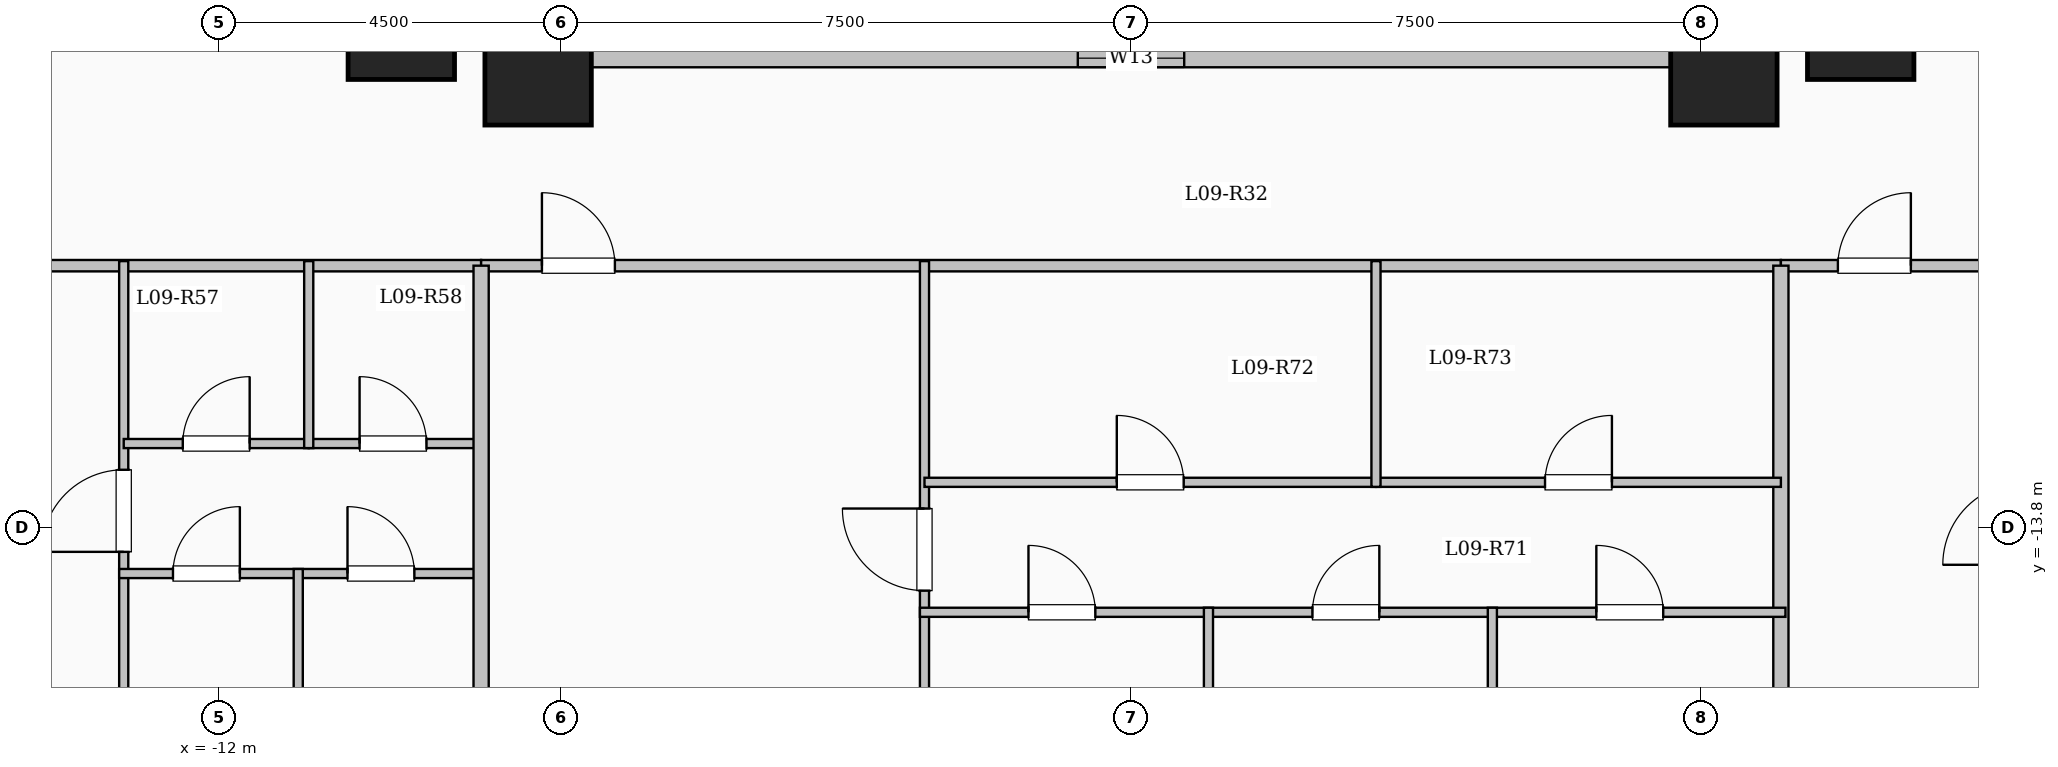
"""IFC4 building model, lengths in metres.
Left out: names, types, materials, properties, quantities, classifications, styles, units other than length and angle.
Written with IfcOpenShell. Run it as: python <this file> out.ifc"""

import sys

from ifc_helpers import new_model, si_unit, direction, frame, frame_2d, origin, origin_2d, place, context, subcontext, project, spatial, rectangle, extrude, element, fill, save


model = new_model("IFC4")
c1 = context("Model", 3, precision=1e-05, world=origin(), true_north=direction((0.0, 1.0)))
c2 = subcontext(c1, "Body", "Model", "MODEL_VIEW")
j1 = project(units=[si_unit("LENGTHUNIT", "METRE"), si_unit("PLANEANGLEUNIT", "RADIAN")], contexts=[c1])
p1 = place(None, origin())
s1 = spatial("IfcSite", under=j1, at=p1, CompositionType="ELEMENT")
p2 = place(p1, origin())
s2 = spatial("IfcBuilding", under=s1, at=p2, CompositionType="ELEMENT")
p3 = place(p2, frame((0.0, 0.0, 37.4)))
s3 = spatial("IfcBuildingStorey", under=s2, at=p3, CompositionType="ELEMENT", Elevation=37.4)
for number, where, z_axis, x_axis in (
    (1, (-7.8, -7.8, 0.0), (0.0, 0.0, 1.0), (1.0, 0.0, 0.0)),
    (2, (7.8, -7.8, 0.0), (0.0, 0.0, 1.0), (1.0, 0.0, 0.0)),
    (3, (-9.6, -7.2, 0.0), (0.0, 0.0, 1.0), (1.0, 0.0, 0.0)),
    (4, (9.6, -7.2, 0.0), (0.0, 0.0, 1.0), (1.0, 0.0, 0.0)),
):
    element("IfcColumn", number, at=place(p3, frame(where, z_axis=z_axis, x_axis=x_axis)), inside=s3, PredefinedType="COLUMN", context=c2, shape_type="SweptSolid", body=[
        extrude(rectangle(XDim=1.4, YDim=1.4, at=origin_2d()), origin(), (0.0, 0.0, 1.0), 3.35),
    ])
p4 = place(p3, frame((-7.62, -7.62, 0.0), z_axis=(0.0, 0.0, 1.0), x_axis=(1.0, 0.0, 0.0)))
e5 = element("IfcWall", 5, at=p4, inside=s3, PredefinedType="SOLIDWALL", context=c2, shape_type="SweptSolid", body=[
    extrude(rectangle(XDim=15.24, YDim=0.24, at=frame_2d((7.62, 0.0))), origin(), (0.0, 0.0, 1.0), 3.1),
])
p5 = place(p4, frame((6.92, 0.0, 0.95)))
e6 = element("IfcOpeningElement", 6, at=p5, cuts=e5, PredefinedType="OPENING", context=c2, shape_type="SweptSolid", body=[
    extrude(rectangle(XDim=1.4, YDim=1.5, at=frame_2d((0.7, 0.75))), frame((0.0, 0.13, 0.0), z_axis=(0.0, -1.0, 0.0), x_axis=(1.0, 0.0, 0.0)), (0.0, 0.0, 1.0), 0.26),
])
p6 = place(p3, frame((7.62, -7.62, 0.0), z_axis=(0.0, 0.0, 1.0), x_axis=(0.0, 1.0, 0.0)))
e7 = element("IfcWall", 7, at=p6, inside=s3, PredefinedType="SOLIDWALL", context=c2, shape_type="SweptSolid", body=[
    extrude(rectangle(XDim=15.24, YDim=0.24, at=frame_2d((7.62, 0.0))), origin(), (0.0, 0.0, 1.0), 3.1),
])
p7 = place(p6, frame((6.92, 0.0, 0.95)))
e8 = element("IfcOpeningElement", 8, at=p7, cuts=e7, PredefinedType="OPENING", context=c2, shape_type="SweptSolid", body=[
    extrude(rectangle(XDim=1.4, YDim=1.5, at=frame_2d((0.7, 0.75))), frame((0.0, 0.13, 0.0), z_axis=(0.0, -1.0, 0.0), x_axis=(1.0, 0.0, 0.0)), (0.0, 0.0, 1.0), 0.26),
])
p8 = place(p3, frame((-7.62, 7.62, 0.0), z_axis=(0.0, 0.0, 1.0), x_axis=(0.0, -1.0, 0.0)))
e9 = element("IfcWall", 9, at=p8, inside=s3, PredefinedType="SOLIDWALL", context=c2, shape_type="SweptSolid", body=[
    extrude(rectangle(XDim=15.24, YDim=0.24, at=frame_2d((7.62, 0.0))), origin(), (0.0, 0.0, 1.0), 3.1),
])
p9 = place(p8, frame((6.92, 0.0, 0.95)))
e10 = element("IfcOpeningElement", 10, at=p9, cuts=e9, PredefinedType="OPENING", context=c2, shape_type="SweptSolid", body=[
    extrude(rectangle(XDim=1.4, YDim=1.5, at=frame_2d((0.7, 0.75))), frame((0.0, 0.13, 0.0), z_axis=(0.0, -1.0, 0.0), x_axis=(1.0, 0.0, 0.0)), (0.0, 0.0, 1.0), 0.26),
])
p10 = place(p3, frame((-22.55, -10.35, 0.0), z_axis=(0.0, 0.0, 1.0), x_axis=(1.0, 0.0, 0.0)))
e11 = element("IfcWall", 11, at=p10, inside=s3, PredefinedType="PARTITIONING", context=c2, shape_type="SweptSolid", body=[
    extrude(rectangle(XDim=14.0, YDim=0.15, at=frame_2d((7.0, 0.0))), origin(), (0.0, 0.0, 1.0), 3.1),
])
p11 = place(p10, frame((0.7, 0.0, 0.0)))
e12 = element("IfcOpeningElement", 12, at=p11, cuts=e11, PredefinedType="OPENING", context=c2, shape_type="SweptSolid", body=[
    extrude(rectangle(XDim=0.96, YDim=2.15, at=frame_2d((0.48, 1.075))), frame((0.0, 0.085, 0.0), z_axis=(0.0, -1.0, 0.0), x_axis=(1.0, 0.0, 0.0)), (0.0, 0.0, 1.0), 0.17),
])
p12 = place(p10, frame((6.838, 0.0, 0.0)))
e13 = element("IfcOpeningElement", 13, at=p12, cuts=e11, PredefinedType="OPENING", context=c2, shape_type="SweptSolid", body=[
    extrude(rectangle(XDim=0.96, YDim=2.15, at=frame_2d((0.48, 1.075))), frame((0.0, 0.085, 0.0), z_axis=(0.0, -1.0, 0.0), x_axis=(1.0, 0.0, 0.0)), (0.0, 0.0, 1.0), 0.17),
])
p13 = place(p3, frame((-8.55, -10.35, 0.0), z_axis=(0.0, 0.0, 1.0), x_axis=(1.0, 0.0, 0.0)))
e14 = element("IfcWall", 14, at=p13, inside=s3, PredefinedType="PARTITIONING", context=c2, shape_type="SweptSolid", body=[
    extrude(rectangle(XDim=17.1, YDim=0.15, at=frame_2d((8.55, 0.0))), origin(), (0.0, 0.0, 1.0), 3.1),
])
p14 = place(p13, frame((0.8, 0.0, 0.0)))
e15 = element("IfcOpeningElement", 15, at=p14, cuts=e14, PredefinedType="OPENING", context=c2, shape_type="SweptSolid", body=[
    extrude(rectangle(XDim=0.96, YDim=2.15, at=frame_2d((0.48, 1.075))), frame((0.0, 0.085, 0.0), z_axis=(0.0, -1.0, 0.0), x_axis=(1.0, 0.0, 0.0)), (0.0, 0.0, 1.0), 0.17),
])
p15 = place(p3, frame((8.55, -10.35, 0.0), z_axis=(0.0, 0.0, 1.0), x_axis=(1.0, 0.0, 0.0)))
e16 = element("IfcWall", 16, at=p15, inside=s3, PredefinedType="PARTITIONING", context=c2, shape_type="SweptSolid", body=[
    extrude(rectangle(XDim=14.0, YDim=0.15, at=frame_2d((7.0, 0.0))), origin(), (0.0, 0.0, 1.0), 3.1),
])
p16 = place(p15, frame((0.75, 0.0, 0.0)))
e17 = element("IfcOpeningElement", 17, at=p16, cuts=e16, PredefinedType="OPENING", context=c2, shape_type="SweptSolid", body=[
    extrude(rectangle(XDim=0.96, YDim=2.15, at=frame_2d((0.48, 1.075))), frame((0.0, 0.085, 0.0), z_axis=(0.0, -1.0, 0.0), x_axis=(1.0, 0.0, 0.0)), (0.0, 0.0, 1.0), 0.17),
])
p17 = place(p15, frame((8.283, 0.0, 0.0)))
e18 = element("IfcOpeningElement", 18, at=p17, cuts=e16, PredefinedType="OPENING", context=c2, shape_type="SweptSolid", body=[
    extrude(rectangle(XDim=0.96, YDim=2.15, at=frame_2d((0.48, 1.075))), frame((0.0, 0.085, 0.0), z_axis=(0.0, -1.0, 0.0), x_axis=(1.0, 0.0, 0.0)), (0.0, 0.0, 1.0), 0.17),
])
p18 = place(p3, frame((-13.252, -23.6, 0.0), z_axis=(0.0, 0.0, 1.0), x_axis=(0.0, 1.0, 0.0)))
e19 = element("IfcWall", 19, at=p18, inside=s3, PredefinedType="PARTITIONING", context=c2, shape_type="SweptSolid", body=[
    extrude(rectangle(XDim=13.31, YDim=0.12, at=frame_2d((6.655, 0.0))), origin(), (0.0, 0.0, 1.0), 3.1),
])
p19 = place(p18, frame((9.485, 0.0, 0.0)))
e20 = element("IfcOpeningElement", 20, at=p19, cuts=e19, PredefinedType="OPENING", context=c2, shape_type="SweptSolid", body=[
    extrude(rectangle(XDim=1.08, YDim=2.15, at=frame_2d((0.54, 1.075))), frame((0.0, 0.07, 0.0), z_axis=(0.0, -1.0, 0.0), x_axis=(1.0, 0.0, 0.0)), (0.0, 0.0, 1.0), 0.14),
])
p20 = place(p3, frame((-13.252, -12.69, 0.0), z_axis=(0.0, 0.0, 1.0), x_axis=(1.0, 0.0, 0.0)))
e21 = element("IfcWall", 21, at=p20, inside=s3, PredefinedType="PARTITIONING", context=c2, shape_type="SweptSolid", body=[
    extrude(rectangle(XDim=2.434, YDim=0.12, at=frame_2d((1.217, 0.0))), origin(), (0.0, 0.0, 1.0), 2.585),
])
p21 = place(p20, frame((0.777, 0.0, 0.0)))
e22 = element("IfcOpeningElement", 22, at=p21, cuts=e21, PredefinedType="OPENING", context=c2, shape_type="SweptSolid", body=[
    extrude(rectangle(XDim=0.88, YDim=2.1, at=frame_2d((0.44, 1.05))), frame((0.0, 0.07, 0.0), z_axis=(0.0, -1.0, 0.0), x_axis=(1.0, 0.0, 0.0)), (0.0, 0.0, 1.0), 0.14),
])
p22 = place(p3, frame((-10.818, -12.69, 0.0), z_axis=(0.0, 0.0, 1.0), x_axis=(1.0, 0.0, 0.0)))
e23 = element("IfcWall", 23, at=p22, inside=s3, PredefinedType="PARTITIONING", context=c2, shape_type="SweptSolid", body=[
    extrude(rectangle(XDim=2.218, YDim=0.12, at=frame_2d((1.109, 0.0))), origin(), (0.0, 0.0, 1.0), 2.585),
])
p23 = place(p22, frame((0.669, 0.0, 0.0)))
e24 = element("IfcOpeningElement", 24, at=p23, cuts=e23, PredefinedType="OPENING", context=c2, shape_type="SweptSolid", body=[
    extrude(rectangle(XDim=0.88, YDim=2.1, at=frame_2d((0.44, 1.05))), frame((0.0, 0.07, 0.0), z_axis=(0.0, -1.0, 0.0), x_axis=(1.0, 0.0, 0.0)), (0.0, 0.0, 1.0), 0.14),
])
p24 = place(p3, frame((-13.312, -14.4, 0.0), z_axis=(0.0, 0.0, 1.0), x_axis=(1.0, 0.0, 0.0)))
e25 = element("IfcWall", 25, at=p24, inside=s3, PredefinedType="PARTITIONING", context=c2, shape_type="SweptSolid", body=[
    extrude(rectangle(XDim=4.772, YDim=0.12, at=frame_2d((2.386, 0.0))), origin(), (0.0, 0.0, 1.0), 3.1),
])
p25 = place(p24, frame((0.708, 0.0, 0.0)))
e26 = element("IfcOpeningElement", 26, at=p25, cuts=e25, PredefinedType="OPENING", context=c2, shape_type="SweptSolid", body=[
    extrude(rectangle(XDim=0.88, YDim=2.1, at=frame_2d((0.44, 1.05))), frame((0.0, 0.07, 0.0), z_axis=(0.0, -1.0, 0.0), x_axis=(1.0, 0.0, 0.0)), (0.0, 0.0, 1.0), 0.14),
])
p26 = place(p24, frame((3.004, 0.0, 0.0)))
e27 = element("IfcOpeningElement", 27, at=p26, cuts=e25, PredefinedType="OPENING", context=c2, shape_type="SweptSolid", body=[
    extrude(rectangle(XDim=0.88, YDim=2.1, at=frame_2d((0.44, 1.05))), frame((0.0, 0.07, 0.0), z_axis=(0.0, -1.0, 0.0), x_axis=(1.0, 0.0, 0.0)), (0.0, 0.0, 1.0), 0.14),
])
p27 = place(p3, frame((-10.818, -12.75, 0.0), z_axis=(0.0, 0.0, 1.0), x_axis=(0.0, 1.0, 0.0)))
e28 = element("IfcWall", 28, at=p27, inside=s3, PredefinedType="PARTITIONING", context=c2, shape_type="SweptSolid", body=[
    extrude(rectangle(XDim=2.46, YDim=0.12, at=frame_2d((1.23, 0.0))), origin(), (0.0, 0.0, 1.0), 3.1),
])
p28 = place(p3, frame((-10.956, -23.611, 0.0), z_axis=(0.0, 0.0, 1.0), x_axis=(0.0, 1.0, 0.0)))
e29 = element("IfcWall", 29, at=p28, inside=s3, PredefinedType="PARTITIONING", context=c2, shape_type="SweptSolid", body=[
    extrude(rectangle(XDim=9.271, YDim=0.12, at=frame_2d((4.635, 0.0))), origin(), (0.0, 0.0, 1.0), 3.1),
])
for number, where, z_axis, x_axis in (
    (30, (-8.55, -24.204, 0.0), (0.0, 0.0, 1.0), (0.0, 1.0, 0.0)),
    (31, (8.55, -24.204, 0.0), (0.0, 0.0, 1.0), (0.0, 1.0, 0.0)),
):
    element("IfcWall", number, at=place(p3, frame(where, z_axis=z_axis, x_axis=x_axis)), inside=s3, PredefinedType="SOLIDWALL", context=c2, shape_type="SweptSolid", body=[
        extrude(rectangle(XDim=13.854, YDim=0.2, at=frame_2d((6.927, 0.0))), origin(), (0.0, 0.0, 1.0), 3.1),
    ])
p29 = place(p3, frame((-2.717, -25.08, 0.0), z_axis=(0.0, 0.0, 1.0), x_axis=(0.0, 1.0, 0.0)))
e32 = element("IfcWall", 32, at=p29, inside=s3, PredefinedType="PARTITIONING", context=c2, shape_type="SweptSolid", body=[
    extrude(rectangle(XDim=14.79, YDim=0.12, at=frame_2d((7.395, 0.0))), origin(), (0.0, 0.0, 1.0), 3.1),
])
p30 = place(p29, frame((10.455, 0.0, 0.0)))
e33 = element("IfcOpeningElement", 33, at=p30, cuts=e32, PredefinedType="OPENING", context=c2, shape_type="SweptSolid", body=[
    extrude(rectangle(XDim=1.08, YDim=2.15, at=frame_2d((0.54, 1.075))), frame((0.0, 0.07, 0.0), z_axis=(0.0, -1.0, 0.0), x_axis=(1.0, 0.0, 0.0)), (0.0, 0.0, 1.0), 0.14),
])
p31 = place(p3, frame((-2.717, -13.2, 0.0), z_axis=(0.0, 0.0, 1.0), x_axis=(1.0, 0.0, 0.0)))
e34 = element("IfcWall", 34, at=p31, inside=s3, PredefinedType="PARTITIONING", context=c2, shape_type="SweptSolid", body=[
    extrude(rectangle(XDim=5.94, YDim=0.12, at=frame_2d((2.97, 0.0))), origin(), (0.0, 0.0, 1.0), 3.1),
])
p32 = place(p31, frame((2.53, 0.0, 0.0)))
e35 = element("IfcOpeningElement", 35, at=p32, cuts=e34, PredefinedType="OPENING", context=c2, shape_type="SweptSolid", body=[
    extrude(rectangle(XDim=0.88, YDim=2.1, at=frame_2d((0.44, 1.05))), frame((0.0, 0.07, 0.0), z_axis=(0.0, -1.0, 0.0), x_axis=(1.0, 0.0, 0.0)), (0.0, 0.0, 1.0), 0.14),
])
p33 = place(p3, frame((3.223, -13.2, 0.0), z_axis=(0.0, 0.0, 1.0), x_axis=(1.0, 0.0, 0.0)))
e36 = element("IfcWall", 36, at=p33, inside=s3, PredefinedType="PARTITIONING", context=c2, shape_type="SweptSolid", body=[
    extrude(rectangle(XDim=5.327, YDim=0.12, at=frame_2d((2.664, 0.0))), origin(), (0.0, 0.0, 1.0), 3.1),
])
p34 = place(p33, frame((2.224, 0.0, 0.0)))
e37 = element("IfcOpeningElement", 37, at=p34, cuts=e36, PredefinedType="OPENING", context=c2, shape_type="SweptSolid", body=[
    extrude(rectangle(XDim=0.88, YDim=2.1, at=frame_2d((0.44, 1.05))), frame((0.0, 0.07, 0.0), z_axis=(0.0, -1.0, 0.0), x_axis=(1.0, 0.0, 0.0)), (0.0, 0.0, 1.0), 0.14),
])
p35 = place(p3, frame((-2.777, -14.91, 0.0), z_axis=(0.0, 0.0, 1.0), x_axis=(1.0, 0.0, 0.0)))
e38 = element("IfcWall", 38, at=p35, inside=s3, PredefinedType="PARTITIONING", context=c2, shape_type="SweptSolid", body=[
    extrude(rectangle(XDim=11.387, YDim=0.12, at=frame_2d((5.694, 0.0))), origin(), (0.0, 0.0, 1.0), 2.585),
])
p36 = place(p35, frame((1.428, 0.0, 0.0)))
e39 = element("IfcOpeningElement", 39, at=p36, cuts=e38, PredefinedType="OPENING", context=c2, shape_type="SweptSolid", body=[
    extrude(rectangle(XDim=0.88, YDim=2.1, at=frame_2d((0.44, 1.05))), frame((0.0, 0.07, 0.0), z_axis=(0.0, -1.0, 0.0), x_axis=(1.0, 0.0, 0.0)), (0.0, 0.0, 1.0), 0.14),
])
p37 = place(p35, frame((5.164, 0.0, 0.0)))
e40 = element("IfcOpeningElement", 40, at=p37, cuts=e38, PredefinedType="OPENING", context=c2, shape_type="SweptSolid", body=[
    extrude(rectangle(XDim=0.88, YDim=2.1, at=frame_2d((0.44, 1.05))), frame((0.0, 0.07, 0.0), z_axis=(0.0, -1.0, 0.0), x_axis=(1.0, 0.0, 0.0)), (0.0, 0.0, 1.0), 0.14),
])
p38 = place(p35, frame((8.899, 0.0, 0.0)))
e41 = element("IfcOpeningElement", 41, at=p38, cuts=e38, PredefinedType="OPENING", context=c2, shape_type="SweptSolid", body=[
    extrude(rectangle(XDim=0.88, YDim=2.1, at=frame_2d((0.44, 1.05))), frame((0.0, 0.07, 0.0), z_axis=(0.0, -1.0, 0.0), x_axis=(1.0, 0.0, 0.0)), (0.0, 0.0, 1.0), 0.14),
])
p39 = place(p3, frame((3.223, -13.26, 0.0), z_axis=(0.0, 0.0, 1.0), x_axis=(0.0, 1.0, 0.0)))
e42 = element("IfcWall", 42, at=p39, inside=s3, PredefinedType="PARTITIONING", context=c2, shape_type="SweptSolid", body=[
    extrude(rectangle(XDim=2.97, YDim=0.12, at=frame_2d((1.485, 0.0))), origin(), (0.0, 0.0, 1.0), 3.1),
])
for number, where, z_axis, x_axis in (
    (43, (1.019, -25.08, 0.0), (0.0, 0.0, 1.0), (0.0, 1.0, 0.0)),
    (44, (4.754, -25.08, 0.0), (0.0, 0.0, 1.0), (0.0, 1.0, 0.0)),
):
    element("IfcWall", number, at=place(p3, frame(where, z_axis=z_axis, x_axis=x_axis)), inside=s3, PredefinedType="PARTITIONING", context=c2, shape_type="SweptSolid", body=[
        extrude(rectangle(XDim=10.23, YDim=0.12, at=frame_2d((5.115, 0.0))), origin(), (0.0, 0.0, 1.0), 3.1),
    ])
p40 = place(p5, origin())
e45 = element("IfcWindow", 45, at=p40, inside=s3, PartitioningType="SINGLE_PANEL", PredefinedType="WINDOW", context=c2, shape_type="SweptSolid", body=[
    extrude(rectangle(XDim=1.4, YDim=1.5, at=frame_2d((0.7, 0.75))), frame((0.0, 0.03, 0.0), z_axis=(0.0, -1.0, 0.0), x_axis=(1.0, 0.0, 0.0)), (0.0, 0.0, 1.0), 0.06),
])
fill(e6, e45)
p41 = place(p19, origin())
e46 = element("IfcDoor", 46, at=p41, inside=s3, OperationType="SINGLE_SWING_LEFT", PredefinedType="DOOR", context=c2, shape_type="SweptSolid", body=[
    extrude(rectangle(XDim=1.08, YDim=2.15, at=frame_2d((0.54, 1.075))), frame((0.0, 0.025, 0.0), z_axis=(0.0, -1.0, 0.0), x_axis=(1.0, 0.0, 0.0)), (0.0, 0.0, 1.0), 0.05),
])
fill(e20, e46)
p42 = place(p21, origin())
e47 = element("IfcDoor", 47, at=p42, inside=s3, OperationType="SINGLE_SWING_RIGHT", PredefinedType="DOOR", context=c2, shape_type="SweptSolid", body=[
    extrude(rectangle(XDim=0.88, YDim=2.1, at=frame_2d((0.44, 1.05))), frame((0.0, 0.025, 0.0), z_axis=(0.0, -1.0, 0.0), x_axis=(1.0, 0.0, 0.0)), (0.0, 0.0, 1.0), 0.05),
])
fill(e22, e47)
p43 = place(p23, origin())
e48 = element("IfcDoor", 48, at=p43, inside=s3, OperationType="SINGLE_SWING_LEFT", PredefinedType="DOOR", context=c2, shape_type="SweptSolid", body=[
    extrude(rectangle(XDim=0.88, YDim=2.1, at=frame_2d((0.44, 1.05))), frame((0.0, 0.025, 0.0), z_axis=(0.0, -1.0, 0.0), x_axis=(1.0, 0.0, 0.0)), (0.0, 0.0, 1.0), 0.05),
])
fill(e24, e48)
p44 = place(p25, origin())
e49 = element("IfcDoor", 49, at=p44, inside=s3, OperationType="SINGLE_SWING_RIGHT", PredefinedType="DOOR", context=c2, shape_type="SweptSolid", body=[
    extrude(rectangle(XDim=0.88, YDim=2.1, at=frame_2d((0.44, 1.05))), frame((0.0, 0.025, 0.0), z_axis=(0.0, -1.0, 0.0), x_axis=(1.0, 0.0, 0.0)), (0.0, 0.0, 1.0), 0.05),
])
fill(e26, e49)
p45 = place(p26, origin())
e50 = element("IfcDoor", 50, at=p45, inside=s3, OperationType="SINGLE_SWING_LEFT", PredefinedType="DOOR", context=c2, shape_type="SweptSolid", body=[
    extrude(rectangle(XDim=0.88, YDim=2.1, at=frame_2d((0.44, 1.05))), frame((0.0, 0.025, 0.0), z_axis=(0.0, -1.0, 0.0), x_axis=(1.0, 0.0, 0.0)), (0.0, 0.0, 1.0), 0.05),
])
fill(e27, e50)
p46 = place(p16, origin())
e51 = element("IfcDoor", 51, at=p46, inside=s3, OperationType="SINGLE_SWING_RIGHT", PredefinedType="DOOR", context=c2, shape_type="SweptSolid", body=[
    extrude(rectangle(XDim=0.96, YDim=2.15, at=frame_2d((0.48, 1.075))), frame((0.0, 0.025, 0.0), z_axis=(0.0, -1.0, 0.0), x_axis=(1.0, 0.0, 0.0)), (0.0, 0.0, 1.0), 0.05),
])
fill(e17, e51)
p47 = place(p14, origin())
e52 = element("IfcDoor", 52, at=p47, inside=s3, OperationType="SINGLE_SWING_LEFT", PredefinedType="DOOR", context=c2, shape_type="SweptSolid", body=[
    extrude(rectangle(XDim=0.96, YDim=2.15, at=frame_2d((0.48, 1.075))), frame((0.0, 0.025, 0.0), z_axis=(0.0, -1.0, 0.0), x_axis=(1.0, 0.0, 0.0)), (0.0, 0.0, 1.0), 0.05),
])
fill(e15, e52)
p48 = place(p30, origin())
e53 = element("IfcDoor", 53, at=p48, inside=s3, OperationType="SINGLE_SWING_RIGHT", PredefinedType="DOOR", context=c2, shape_type="SweptSolid", body=[
    extrude(rectangle(XDim=1.08, YDim=2.15, at=frame_2d((0.54, 1.075))), frame((0.0, 0.025, 0.0), z_axis=(0.0, -1.0, 0.0), x_axis=(1.0, 0.0, 0.0)), (0.0, 0.0, 1.0), 0.05),
])
fill(e33, e53)
p49 = place(p32, origin())
e54 = element("IfcDoor", 54, at=p49, inside=s3, OperationType="SINGLE_SWING_LEFT", PredefinedType="DOOR", context=c2, shape_type="SweptSolid", body=[
    extrude(rectangle(XDim=0.88, YDim=2.1, at=frame_2d((0.44, 1.05))), frame((0.0, 0.025, 0.0), z_axis=(0.0, -1.0, 0.0), x_axis=(1.0, 0.0, 0.0)), (0.0, 0.0, 1.0), 0.05),
])
fill(e35, e54)
p50 = place(p34, origin())
e55 = element("IfcDoor", 55, at=p50, inside=s3, OperationType="SINGLE_SWING_RIGHT", PredefinedType="DOOR", context=c2, shape_type="SweptSolid", body=[
    extrude(rectangle(XDim=0.88, YDim=2.1, at=frame_2d((0.44, 1.05))), frame((0.0, 0.025, 0.0), z_axis=(0.0, -1.0, 0.0), x_axis=(1.0, 0.0, 0.0)), (0.0, 0.0, 1.0), 0.05),
])
fill(e37, e55)
p51 = place(p36, origin())
e56 = element("IfcDoor", 56, at=p51, inside=s3, OperationType="SINGLE_SWING_LEFT", PredefinedType="DOOR", context=c2, shape_type="SweptSolid", body=[
    extrude(rectangle(XDim=0.88, YDim=2.1, at=frame_2d((0.44, 1.05))), frame((0.0, 0.025, 0.0), z_axis=(0.0, -1.0, 0.0), x_axis=(1.0, 0.0, 0.0)), (0.0, 0.0, 1.0), 0.05),
])
fill(e39, e56)
p52 = place(p37, origin())
e57 = element("IfcDoor", 57, at=p52, inside=s3, OperationType="SINGLE_SWING_RIGHT", PredefinedType="DOOR", context=c2, shape_type="SweptSolid", body=[
    extrude(rectangle(XDim=0.88, YDim=2.1, at=frame_2d((0.44, 1.05))), frame((0.0, 0.025, 0.0), z_axis=(0.0, -1.0, 0.0), x_axis=(1.0, 0.0, 0.0)), (0.0, 0.0, 1.0), 0.05),
])
fill(e40, e57)
p53 = place(p38, origin())
e58 = element("IfcDoor", 58, at=p53, inside=s3, OperationType="SINGLE_SWING_LEFT", PredefinedType="DOOR", context=c2, shape_type="SweptSolid", body=[
    extrude(rectangle(XDim=0.88, YDim=2.1, at=frame_2d((0.44, 1.05))), frame((0.0, 0.025, 0.0), z_axis=(0.0, -1.0, 0.0), x_axis=(1.0, 0.0, 0.0)), (0.0, 0.0, 1.0), 0.05),
])
fill(e41, e58)
save(model, sys.argv[1])
